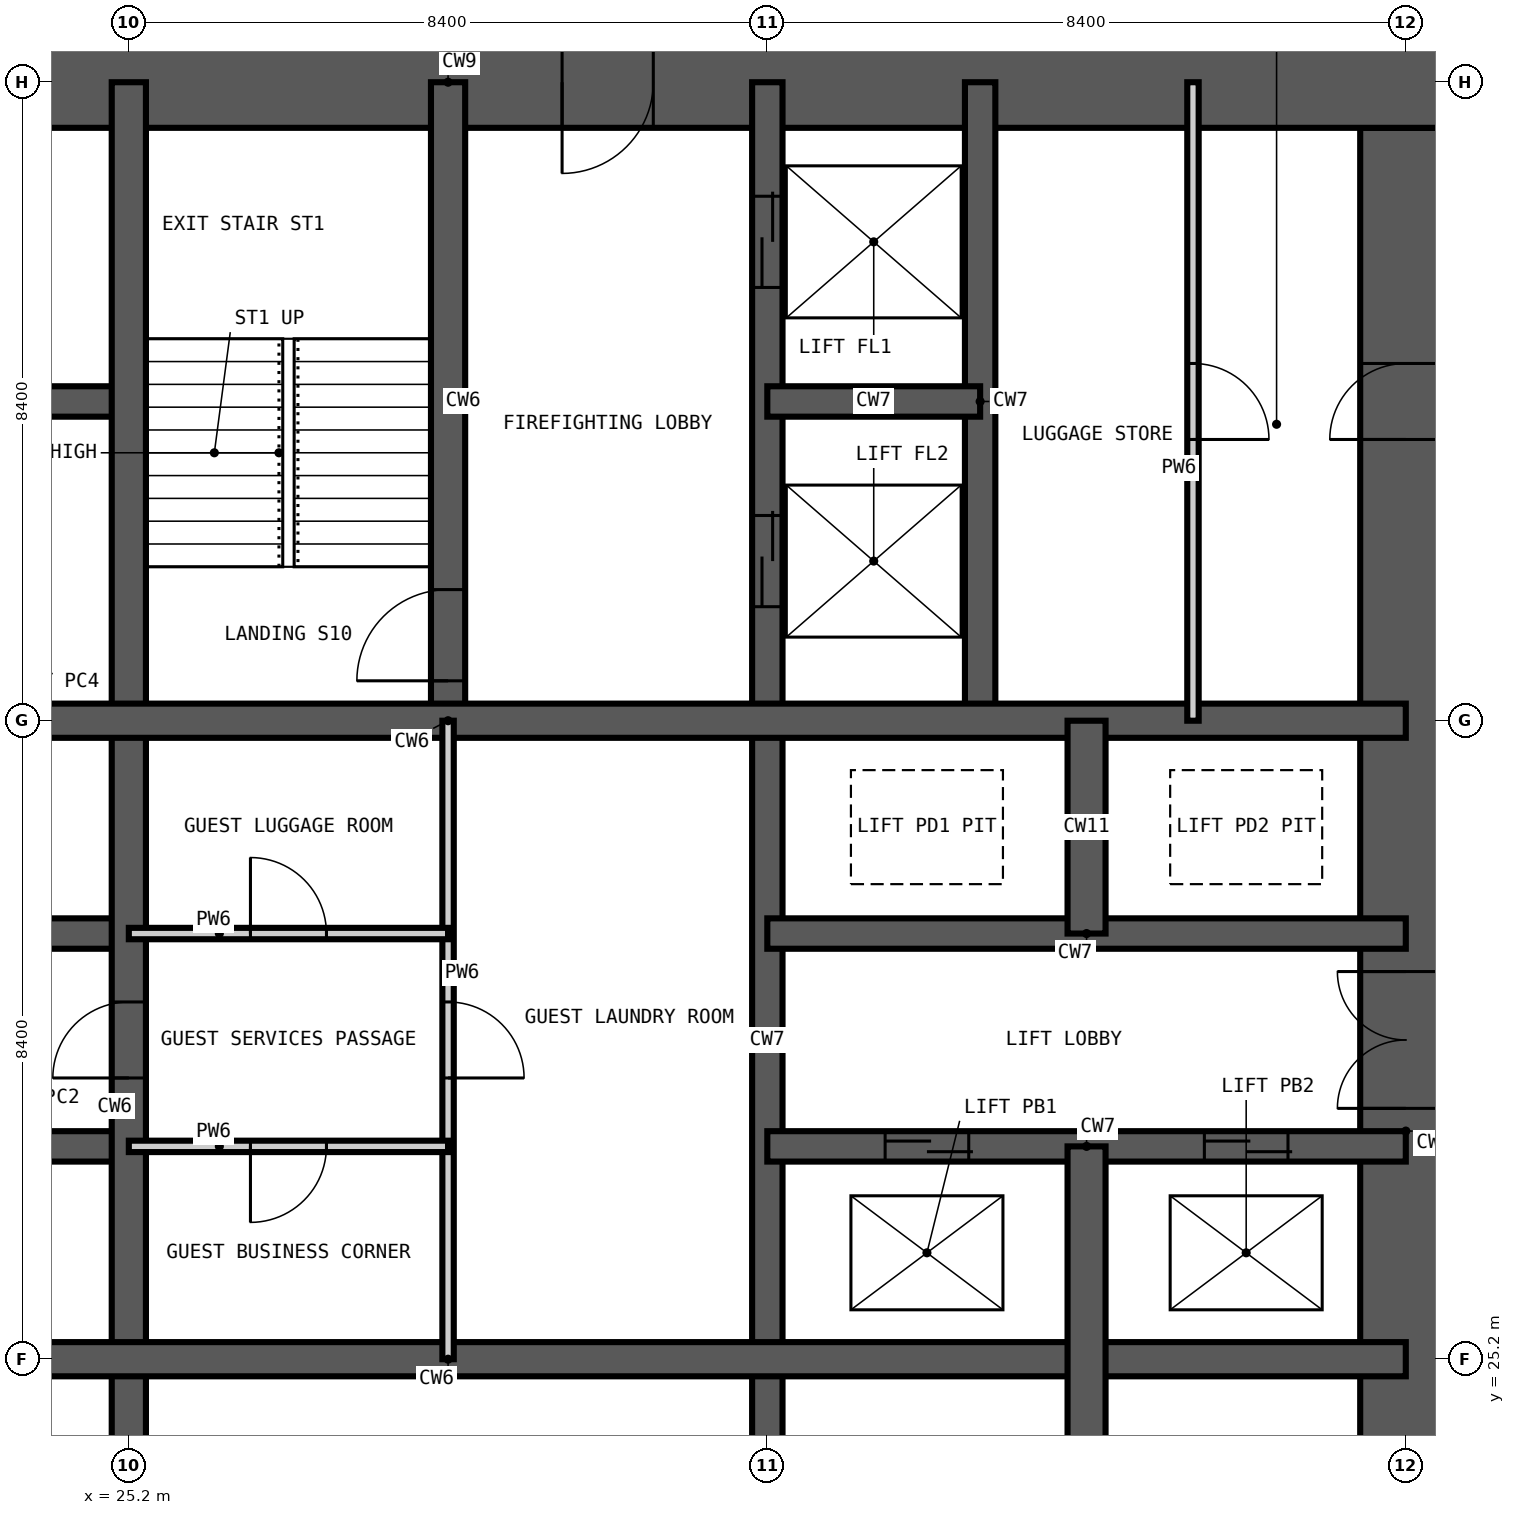
"""IFC4 building model, lengths in metres.
Left out: names, types, materials, properties, quantities, classifications, styles, units other than length and angle.
Written with IfcOpenShell. Run it as: python <this file> out.ifc"""

import sys

from ifc_helpers import new_model, si_unit, direction, frame, frame_2d, origin, place, context, subcontext, project, spatial, rectangle, extrude, element, fill, save


model = new_model("IFC4")
c1 = context("Model", 3, precision=1e-05, world=origin(), true_north=direction((0.0, 1.0)))
c2 = subcontext(c1, "Body", "Model", "MODEL_VIEW")
j1 = project(units=[si_unit("LENGTHUNIT", "METRE"), si_unit("PLANEANGLEUNIT", "RADIAN")], contexts=[c1])
p1 = place(None, origin())
s1 = spatial("IfcSite", under=j1, at=p1, CompositionType="ELEMENT")
p2 = place(p1, origin())
s2 = spatial("IfcBuilding", under=s1, at=p2, CompositionType="ELEMENT")
p3 = place(p2, frame((0.0, 0.0, 144.0)))
s3 = spatial("IfcBuildingStorey", under=s2, at=p3, CompositionType="ELEMENT", Elevation=144.0)
p4 = place(p3, frame((42.0, 17.4, -0.35), z_axis=(0.0, 0.0, 1.0), x_axis=(0.0, 1.0, 0.0)))
e1 = element("IfcWall", 1, at=p4, inside=s3, PredefinedType="SHEAR", context=c2, shape_type="SweptSolid", body=[
    extrude(rectangle(XDim=24.0, YDim=1.2, at=frame_2d((12.0, 0.0))), origin(), (0.0, 0.0, 1.0), 3.6),
])
p5 = place(p4, frame((0.2, 0.0, 0.35)))
e2 = element("IfcOpeningElement", 2, at=p5, cuts=e1, PredefinedType="OPENING", context=c2, shape_type="SweptSolid", body=[
    extrude(rectangle(XDim=1.2, YDim=2.2, at=frame_2d((0.6, 1.1))), frame((0.0, 0.61, 0.0), z_axis=(0.0, -1.0, 0.0), x_axis=(1.0, 0.0, 0.0)), (0.0, 0.0, 1.0), 1.22),
])
p6 = place(p4, frame((11.1, 0.0, 0.35)))
e3 = element("IfcOpeningElement", 3, at=p6, cuts=e1, PredefinedType="OPENING", context=c2, shape_type="SweptSolid", body=[
    extrude(rectangle(XDim=1.8, YDim=2.2, at=frame_2d((0.9, 1.1))), frame((0.0, 0.61, 0.0), z_axis=(0.0, -1.0, 0.0), x_axis=(1.0, 0.0, 0.0)), (0.0, 0.0, 1.0), 1.22),
])
p7 = place(p4, frame((19.9, 0.0, 0.35)))
e4 = element("IfcOpeningElement", 4, at=p7, cuts=e1, PredefinedType="OPENING", context=c2, shape_type="SweptSolid", body=[
    extrude(rectangle(XDim=1.0, YDim=2.1, at=frame_2d((0.5, 1.05))), frame((0.0, 0.61, 0.0), z_axis=(0.0, -1.0, 0.0), x_axis=(1.0, 0.0, 0.0)), (0.0, 0.0, 1.0), 1.22),
])
p8 = place(p3, frame((42.6, 42.0, -0.35), z_axis=(0.0, 0.0, 1.0), x_axis=(-1.0, 0.0, 0.0)))
e5 = element("IfcWall", 5, at=p8, inside=s3, PredefinedType="SHEAR", context=c2, shape_type="SweptSolid", body=[
    extrude(rectangle(XDim=26.4, YDim=1.2, at=frame_2d((13.2, 0.0))), origin(), (0.0, 0.0, 1.0), 3.6),
])
p9 = place(p8, frame((21.1, 0.0, 0.35)))
e6 = element("IfcOpeningElement", 6, at=p9, cuts=e5, PredefinedType="OPENING", context=c2, shape_type="SweptSolid", body=[
    extrude(rectangle(XDim=1.0, YDim=2.1, at=frame_2d((0.5, 1.05))), frame((0.0, 0.61, 0.0), z_axis=(0.0, -1.0, 0.0), x_axis=(1.0, 0.0, 0.0)), (0.0, 0.0, 1.0), 1.22),
])
p10 = place(p8, frame((10.5, 0.0, 0.35)))
e7 = element("IfcOpeningElement", 7, at=p10, cuts=e5, PredefinedType="OPENING", context=c2, shape_type="SweptSolid", body=[
    extrude(rectangle(XDim=1.2, YDim=2.2, at=frame_2d((0.6, 1.1))), frame((0.0, 0.61, 0.0), z_axis=(0.0, -1.0, 0.0), x_axis=(1.0, 0.0, 0.0)), (0.0, 0.0, 1.0), 1.22),
])
p11 = place(p3, frame((33.6, 16.8, -0.35), z_axis=(0.0, 0.0, 1.0), x_axis=(0.0, 1.0, 0.0)))
e8 = element("IfcWall", 8, at=p11, inside=s3, PredefinedType="SHEAR", context=c2, shape_type="SweptSolid", body=[
    extrude(rectangle(XDim=25.2, YDim=0.4, at=frame_2d((12.6, 0.0))), origin(), (0.0, 0.0, 1.0), 3.6),
])
p12 = place(p11, frame((22.5, 0.0, 0.35)))
e9 = element("IfcOpeningElement", 9, at=p12, cuts=e8, PredefinedType="OPENING", context=c2, shape_type="SweptSolid", body=[
    extrude(rectangle(XDim=1.2, YDim=2.2, at=frame_2d((0.6, 1.1))), frame((0.0, 0.21, 0.0), z_axis=(0.0, -1.0, 0.0), x_axis=(1.0, 0.0, 0.0)), (0.0, 0.0, 1.0), 0.42),
])
p13 = place(p11, frame((18.3, 0.0, 0.35)))
e10 = element("IfcOpeningElement", 10, at=p13, cuts=e8, PredefinedType="OPENING", context=c2, shape_type="SweptSolid", body=[
    extrude(rectangle(XDim=1.2, YDim=2.2, at=frame_2d((0.6, 1.1))), frame((0.0, 0.21, 0.0), z_axis=(0.0, -1.0, 0.0), x_axis=(1.0, 0.0, 0.0)), (0.0, 0.0, 1.0), 0.42),
])
p14 = place(p3, frame((36.4, 33.6, -0.35), z_axis=(0.0, 0.0, 1.0), x_axis=(0.0, 1.0, 0.0)))
e11 = element("IfcWall", 11, at=p14, inside=s3, PredefinedType="SHEAR", context=c2, shape_type="SweptSolid", body=[
    extrude(rectangle(XDim=8.4, YDim=0.4, at=frame_2d((4.2, 0.0))), origin(), (0.0, 0.0, 1.0), 3.6),
])
p15 = place(p3, frame((16.8, 28.0, -0.35), z_axis=(0.0, 0.0, 1.0), x_axis=(1.0, 0.0, 0.0)))
e12 = element("IfcWall", 12, at=p15, inside=s3, PredefinedType="SHEAR", context=c2, shape_type="SweptSolid", body=[
    extrude(rectangle(XDim=8.4, YDim=0.4, at=frame_2d((4.2, 0.0))), origin(), (0.0, 0.0, 1.0), 3.6),
])
p16 = place(p15, frame((1.55, 0.0, 0.35)))
e13 = element("IfcOpeningElement", 13, at=p16, cuts=e12, PredefinedType="OPENING", context=c2, shape_type="SweptSolid", body=[
    extrude(rectangle(XDim=1.1, YDim=2.2, at=frame_2d((0.55, 1.1))), frame((0.0, 0.21, 0.0), z_axis=(0.0, -1.0, 0.0), x_axis=(1.0, 0.0, 0.0)), (0.0, 0.0, 1.0), 0.42),
])
p17 = place(p15, frame((5.75, 0.0, 0.35)))
e14 = element("IfcOpeningElement", 14, at=p17, cuts=e12, PredefinedType="OPENING", context=c2, shape_type="SweptSolid", body=[
    extrude(rectangle(XDim=1.1, YDim=2.2, at=frame_2d((0.55, 1.1))), frame((0.0, 0.21, 0.0), z_axis=(0.0, -1.0, 0.0), x_axis=(1.0, 0.0, 0.0)), (0.0, 0.0, 1.0), 0.42),
])
p18 = place(p3, frame((33.6, 28.0, -0.35), z_axis=(0.0, 0.0, 1.0), x_axis=(1.0, 0.0, 0.0)))
e15 = element("IfcWall", 15, at=p18, inside=s3, PredefinedType="SHEAR", context=c2, shape_type="SweptSolid", body=[
    extrude(rectangle(XDim=8.4, YDim=0.4, at=frame_2d((4.2, 0.0))), origin(), (0.0, 0.0, 1.0), 3.6),
])
p19 = place(p18, frame((1.55, 0.0, 0.35)))
e16 = element("IfcOpeningElement", 16, at=p19, cuts=e15, PredefinedType="OPENING", context=c2, shape_type="SweptSolid", body=[
    extrude(rectangle(XDim=1.1, YDim=2.2, at=frame_2d((0.55, 1.1))), frame((0.0, 0.21, 0.0), z_axis=(0.0, -1.0, 0.0), x_axis=(1.0, 0.0, 0.0)), (0.0, 0.0, 1.0), 0.42),
])
p20 = place(p18, frame((5.75, 0.0, 0.35)))
e17 = element("IfcOpeningElement", 17, at=p20, cuts=e15, PredefinedType="OPENING", context=c2, shape_type="SweptSolid", body=[
    extrude(rectangle(XDim=1.1, YDim=2.2, at=frame_2d((0.55, 1.1))), frame((0.0, 0.21, 0.0), z_axis=(0.0, -1.0, 0.0), x_axis=(1.0, 0.0, 0.0)), (0.0, 0.0, 1.0), 0.42),
])
p21 = place(p3, frame((16.8, 30.8, -0.35), z_axis=(0.0, 0.0, 1.0), x_axis=(1.0, 0.0, 0.0)))
e18 = element("IfcWall", 18, at=p21, inside=s3, PredefinedType="SHEAR", context=c2, shape_type="SweptSolid", body=[
    extrude(rectangle(XDim=8.4, YDim=0.4, at=frame_2d((4.2, 0.0))), origin(), (0.0, 0.0, 1.0), 3.6),
])
p22 = place(p21, frame((1.55, 0.0, 0.35)))
e19 = element("IfcOpeningElement", 19, at=p22, cuts=e18, PredefinedType="OPENING", context=c2, shape_type="SweptSolid", body=[
    extrude(rectangle(XDim=1.1, YDim=2.2, at=frame_2d((0.55, 1.1))), frame((0.0, 0.21, 0.0), z_axis=(0.0, -1.0, 0.0), x_axis=(1.0, 0.0, 0.0)), (0.0, 0.0, 1.0), 0.42),
])
p23 = place(p21, frame((5.75, 0.0, 0.35)))
e20 = element("IfcOpeningElement", 20, at=p23, cuts=e18, PredefinedType="OPENING", context=c2, shape_type="SweptSolid", body=[
    extrude(rectangle(XDim=1.1, YDim=2.2, at=frame_2d((0.55, 1.1))), frame((0.0, 0.21, 0.0), z_axis=(0.0, -1.0, 0.0), x_axis=(1.0, 0.0, 0.0)), (0.0, 0.0, 1.0), 0.42),
])
for number, where, z_axis, x_axis in (
    (21, (33.6, 30.8, -0.35), (0.0, 0.0, 1.0), (1.0, 0.0, 0.0)),
    (22, (16.8, 37.8, -0.35), (0.0, 0.0, 1.0), (1.0, 0.0, 0.0)),
):
    element("IfcWall", number, at=place(p3, frame(where, z_axis=z_axis, x_axis=x_axis)), inside=s3, PredefinedType="SHEAR", context=c2, shape_type="SweptSolid", body=[
        extrude(rectangle(XDim=8.4, YDim=0.4, at=frame_2d((4.2, 0.0))), origin(), (0.0, 0.0, 1.0), 3.6),
    ])
p24 = place(p3, frame((33.6, 37.8, -0.35), z_axis=(0.0, 0.0, 1.0), x_axis=(1.0, 0.0, 0.0)))
e23 = element("IfcWall", 23, at=p24, inside=s3, PredefinedType="SHEAR", context=c2, shape_type="SweptSolid", body=[
    extrude(rectangle(XDim=2.8, YDim=0.4, at=frame_2d((1.4, 0.0))), origin(), (0.0, 0.0, 1.0), 3.6),
])
p25 = place(p3, frame((25.2, 16.8, -0.35), z_axis=(0.0, 0.0, 1.0), x_axis=(0.0, 1.0, 0.0)))
e24 = element("IfcWall", 24, at=p25, inside=s3, PredefinedType="SHEAR", context=c2, shape_type="SweptSolid", body=[
    extrude(rectangle(XDim=25.2, YDim=0.45, at=frame_2d((12.6, 0.0))), origin(), (0.0, 0.0, 1.0), 3.6),
])
p26 = place(p25, frame((12.1, 0.0, 0.35)))
e25 = element("IfcOpeningElement", 25, at=p26, cuts=e24, PredefinedType="OPENING", context=c2, shape_type="SweptSolid", body=[
    extrude(rectangle(XDim=1.0, YDim=2.1, at=frame_2d((0.5, 1.05))), frame((0.0, 0.235, 0.0), z_axis=(0.0, -1.0, 0.0), x_axis=(1.0, 0.0, 0.0)), (0.0, 0.0, 1.0), 0.47),
])
p27 = place(p3, frame((29.4, 33.6, -0.35), z_axis=(0.0, 0.0, 1.0), x_axis=(0.0, 1.0, 0.0)))
e26 = element("IfcWall", 26, at=p27, inside=s3, PredefinedType="SHEAR", context=c2, shape_type="SweptSolid", body=[
    extrude(rectangle(XDim=8.4, YDim=0.45, at=frame_2d((4.2, 0.0))), origin(), (0.0, 0.0, 1.0), 3.6),
])
p28 = place(p27, frame((0.525, 0.0, 0.35)))
e27 = element("IfcOpeningElement", 27, at=p28, cuts=e26, PredefinedType="OPENING", context=c2, shape_type="SweptSolid", body=[
    extrude(rectangle(XDim=1.2, YDim=2.2, at=frame_2d((0.6, 1.1))), frame((0.0, 0.235, 0.0), z_axis=(0.0, -1.0, 0.0), x_axis=(1.0, 0.0, 0.0)), (0.0, 0.0, 1.0), 0.47),
])
for number, where, z_axis, x_axis in (
    (28, (16.8, 25.2, -0.35), (0.0, 0.0, 1.0), (1.0, 0.0, 0.0)),
    (29, (16.8, 33.6, -0.35), (0.0, 0.0, 1.0), (1.0, 0.0, 0.0)),
):
    element("IfcWall", number, at=place(p3, frame(where, z_axis=z_axis, x_axis=x_axis)), inside=s3, PredefinedType="SHEAR", context=c2, shape_type="SweptSolid", body=[
        extrude(rectangle(XDim=25.2, YDim=0.45, at=frame_2d((12.6, 0.0))), origin(), (0.0, 0.0, 1.0), 3.6),
    ])
p29 = place(p3, frame((37.8, 16.8, -0.35), z_axis=(0.0, 0.0, 1.0), x_axis=(0.0, 1.0, 0.0)))
e30 = element("IfcWall", 30, at=p29, inside=s3, PredefinedType="SHEAR", context=c2, shape_type="SweptSolid", body=[
    extrude(rectangle(XDim=11.2, YDim=0.5, at=frame_2d((5.6, 0.0))), origin(), (0.0, 0.0, 1.0), 3.6),
])
p30 = place(p3, frame((37.8, 30.8, -0.35), z_axis=(0.0, 0.0, 1.0), x_axis=(0.0, 1.0, 0.0)))
e31 = element("IfcWall", 31, at=p30, inside=s3, PredefinedType="SHEAR", context=c2, shape_type="SweptSolid", body=[
    extrude(rectangle(XDim=2.8, YDim=0.5, at=frame_2d((1.4, 0.0))), origin(), (0.0, 0.0, 1.0), 3.6),
])
p31 = place(p3, frame((29.4, 25.2, 0.0), z_axis=(0.0, 0.0, 1.0), x_axis=(0.0, 1.0, 0.0)))
e32 = element("IfcWall", 32, at=p31, inside=s3, PredefinedType="PARTITIONING", context=c2, shape_type="SweptSolid", body=[
    extrude(rectangle(XDim=8.4, YDim=0.15, at=frame_2d((4.2, 0.0))), origin(), (0.0, 0.0, 1.0), 3.25),
])
p32 = place(p31, frame((3.7, 0.0, 0.0)))
e33 = element("IfcOpeningElement", 33, at=p32, cuts=e32, PredefinedType="OPENING", context=c2, shape_type="SweptSolid", body=[
    extrude(rectangle(XDim=1.0, YDim=2.1, at=frame_2d((0.5, 1.05))), frame((0.0, 0.085, 0.0), z_axis=(0.0, -1.0, 0.0), x_axis=(1.0, 0.0, 0.0)), (0.0, 0.0, 1.0), 0.17),
])
p33 = place(p3, frame((39.2, 33.6, 0.0), z_axis=(0.0, 0.0, 1.0), x_axis=(0.0, 1.0, 0.0)))
e34 = element("IfcWall", 34, at=p33, inside=s3, PredefinedType="PARTITIONING", context=c2, shape_type="SweptSolid", body=[
    extrude(rectangle(XDim=8.4, YDim=0.15, at=frame_2d((4.2, 0.0))), origin(), (0.0, 0.0, 1.0), 3.25),
])
p34 = place(p33, frame((3.7, 0.0, 0.0)))
e35 = element("IfcOpeningElement", 35, at=p34, cuts=e34, PredefinedType="OPENING", context=c2, shape_type="SweptSolid", body=[
    extrude(rectangle(XDim=1.0, YDim=2.1, at=frame_2d((0.5, 1.05))), frame((0.0, 0.085, 0.0), z_axis=(0.0, -1.0, 0.0), x_axis=(1.0, 0.0, 0.0)), (0.0, 0.0, 1.0), 0.17),
])
p35 = place(p3, frame((25.2, 28.0, 0.0), z_axis=(0.0, 0.0, 1.0), x_axis=(1.0, 0.0, 0.0)))
e36 = element("IfcWall", 36, at=p35, inside=s3, PredefinedType="PARTITIONING", context=c2, shape_type="SweptSolid", body=[
    extrude(rectangle(XDim=4.2, YDim=0.15, at=frame_2d((2.1, 0.0))), origin(), (0.0, 0.0, 1.0), 3.25),
])
p36 = place(p35, frame((1.6, 0.0, 0.0)))
e37 = element("IfcOpeningElement", 37, at=p36, cuts=e36, PredefinedType="OPENING", context=c2, shape_type="SweptSolid", body=[
    extrude(rectangle(XDim=1.0, YDim=2.1, at=frame_2d((0.5, 1.05))), frame((0.0, 0.085, 0.0), z_axis=(0.0, -1.0, 0.0), x_axis=(1.0, 0.0, 0.0)), (0.0, 0.0, 1.0), 0.17),
])
p37 = place(p3, frame((25.2, 30.8, 0.0), z_axis=(0.0, 0.0, 1.0), x_axis=(1.0, 0.0, 0.0)))
e38 = element("IfcWall", 38, at=p37, inside=s3, PredefinedType="PARTITIONING", context=c2, shape_type="SweptSolid", body=[
    extrude(rectangle(XDim=4.2, YDim=0.15, at=frame_2d((2.1, 0.0))), origin(), (0.0, 0.0, 1.0), 3.25),
])
p38 = place(p37, frame((1.6, 0.0, 0.0)))
e39 = element("IfcOpeningElement", 39, at=p38, cuts=e38, PredefinedType="OPENING", context=c2, shape_type="SweptSolid", body=[
    extrude(rectangle(XDim=1.0, YDim=2.1, at=frame_2d((0.5, 1.05))), frame((0.0, 0.085, 0.0), z_axis=(0.0, -1.0, 0.0), x_axis=(1.0, 0.0, 0.0)), (0.0, 0.0, 1.0), 0.17),
])
p39 = place(p28, origin())
e40 = element("IfcDoor", 40, at=p39, inside=s3, OperationType="SINGLE_SWING_LEFT", PredefinedType="DOOR", context=c2, shape_type="SweptSolid", body=[
    extrude(rectangle(XDim=1.2, YDim=2.2, at=frame_2d((0.6, 1.1))), frame((0.0, 0.025, 0.0), z_axis=(0.0, -1.0, 0.0), x_axis=(1.0, 0.0, 0.0)), (0.0, 0.0, 1.0), 0.05),
])
fill(e27, e40)
p40 = place(p19, origin())
e41 = element("IfcDoor", 41, at=p40, inside=s3, OperationType="DOUBLE_DOOR_SLIDING", PredefinedType="DOOR", context=c2, shape_type="SweptSolid", body=[
    extrude(rectangle(XDim=1.1, YDim=2.2, at=frame_2d((0.55, 1.1))), frame((0.0, 0.025, 0.0), z_axis=(0.0, -1.0, 0.0), x_axis=(1.0, 0.0, 0.0)), (0.0, 0.0, 1.0), 0.05),
])
fill(e16, e41)
p41 = place(p20, origin())
e42 = element("IfcDoor", 42, at=p41, inside=s3, OperationType="DOUBLE_DOOR_SLIDING", PredefinedType="DOOR", context=c2, shape_type="SweptSolid", body=[
    extrude(rectangle(XDim=1.1, YDim=2.2, at=frame_2d((0.55, 1.1))), frame((0.0, 0.025, 0.0), z_axis=(0.0, -1.0, 0.0), x_axis=(1.0, 0.0, 0.0)), (0.0, 0.0, 1.0), 0.05),
])
fill(e17, e42)
p42 = place(p12, origin())
e43 = element("IfcDoor", 43, at=p42, inside=s3, OperationType="DOUBLE_DOOR_SLIDING", PredefinedType="DOOR", context=c2, shape_type="SweptSolid", body=[
    extrude(rectangle(XDim=1.2, YDim=2.2, at=frame_2d((0.6, 1.1))), frame((0.0, 0.025, 0.0), z_axis=(0.0, -1.0, 0.0), x_axis=(1.0, 0.0, 0.0)), (0.0, 0.0, 1.0), 0.05),
])
fill(e9, e43)
p43 = place(p13, origin())
e44 = element("IfcDoor", 44, at=p43, inside=s3, OperationType="DOUBLE_DOOR_SLIDING", PredefinedType="DOOR", context=c2, shape_type="SweptSolid", body=[
    extrude(rectangle(XDim=1.2, YDim=2.2, at=frame_2d((0.6, 1.1))), frame((0.0, 0.025, 0.0), z_axis=(0.0, -1.0, 0.0), x_axis=(1.0, 0.0, 0.0)), (0.0, 0.0, 1.0), 0.05),
])
fill(e10, e44)
p44 = place(p26, origin())
e45 = element("IfcDoor", 45, at=p44, inside=s3, OperationType="SINGLE_SWING_LEFT", PredefinedType="DOOR", context=c2, shape_type="SweptSolid", body=[
    extrude(rectangle(XDim=1.0, YDim=2.1, at=frame_2d((0.5, 1.05))), frame((0.0, 0.025, 0.0), z_axis=(0.0, -1.0, 0.0), x_axis=(1.0, 0.0, 0.0)), (0.0, 0.0, 1.0), 0.05),
])
fill(e25, e45)
p45 = place(p36, frame((1.0, 0.0, 0.0), z_axis=(0.0, 0.0, 1.0), x_axis=(-1.0, 0.0, 0.0)))
e46 = element("IfcDoor", 46, at=p45, inside=s3, OperationType="SINGLE_SWING_RIGHT", PredefinedType="DOOR", context=c2, shape_type="SweptSolid", body=[
    extrude(rectangle(XDim=1.0, YDim=2.1, at=frame_2d((0.5, 1.05))), frame((0.0, 0.025, 0.0), z_axis=(0.0, -1.0, 0.0), x_axis=(1.0, 0.0, 0.0)), (0.0, 0.0, 1.0), 0.05),
])
fill(e37, e46)
p46 = place(p38, origin())
e47 = element("IfcDoor", 47, at=p46, inside=s3, OperationType="SINGLE_SWING_LEFT", PredefinedType="DOOR", context=c2, shape_type="SweptSolid", body=[
    extrude(rectangle(XDim=1.0, YDim=2.1, at=frame_2d((0.5, 1.05))), frame((0.0, 0.025, 0.0), z_axis=(0.0, -1.0, 0.0), x_axis=(1.0, 0.0, 0.0)), (0.0, 0.0, 1.0), 0.05),
])
fill(e39, e47)
p47 = place(p32, frame((1.0, 0.0, 0.0), z_axis=(0.0, 0.0, 1.0), x_axis=(-1.0, 0.0, 0.0)))
e48 = element("IfcDoor", 48, at=p47, inside=s3, OperationType="SINGLE_SWING_RIGHT", PredefinedType="DOOR", context=c2, shape_type="SweptSolid", body=[
    extrude(rectangle(XDim=1.0, YDim=2.1, at=frame_2d((0.5, 1.05))), frame((0.0, 0.025, 0.0), z_axis=(0.0, -1.0, 0.0), x_axis=(1.0, 0.0, 0.0)), (0.0, 0.0, 1.0), 0.05),
])
fill(e33, e48)
p48 = place(p6, origin())
e49 = element("IfcDoor", 49, at=p48, inside=s3, OperationType="DOUBLE_DOOR_DOUBLE_SWING", PredefinedType="DOOR", context=c2, shape_type="SweptSolid", body=[
    extrude(rectangle(XDim=1.8, YDim=2.2, at=frame_2d((0.9, 1.1))), frame((0.0, 0.025, 0.0), z_axis=(0.0, -1.0, 0.0), x_axis=(1.0, 0.0, 0.0)), (0.0, 0.0, 1.0), 0.05),
])
fill(e3, e49)
p49 = place(p10, origin())
e50 = element("IfcDoor", 50, at=p49, inside=s3, OperationType="SINGLE_SWING_RIGHT", PredefinedType="DOOR", context=c2, shape_type="SweptSolid", body=[
    extrude(rectangle(XDim=1.2, YDim=2.2, at=frame_2d((0.6, 1.1))), frame((0.0, 0.025, 0.0), z_axis=(0.0, -1.0, 0.0), x_axis=(1.0, 0.0, 0.0)), (0.0, 0.0, 1.0), 0.05),
])
fill(e7, e50)
p50 = place(p7, origin())
e51 = element("IfcDoor", 51, at=p50, inside=s3, OperationType="SINGLE_SWING_LEFT", PredefinedType="DOOR", context=c2, shape_type="SweptSolid", body=[
    extrude(rectangle(XDim=1.0, YDim=2.1, at=frame_2d((0.5, 1.05))), frame((0.0, 0.025, 0.0), z_axis=(0.0, -1.0, 0.0), x_axis=(1.0, 0.0, 0.0)), (0.0, 0.0, 1.0), 0.05),
])
fill(e4, e51)
p51 = place(p34, frame((1.0, 0.0, 0.0), z_axis=(0.0, 0.0, 1.0), x_axis=(-1.0, 0.0, 0.0)))
e52 = element("IfcDoor", 52, at=p51, inside=s3, OperationType="SINGLE_SWING_RIGHT", PredefinedType="DOOR", context=c2, shape_type="SweptSolid", body=[
    extrude(rectangle(XDim=1.0, YDim=2.1, at=frame_2d((0.5, 1.05))), frame((0.0, 0.025, 0.0), z_axis=(0.0, -1.0, 0.0), x_axis=(1.0, 0.0, 0.0)), (0.0, 0.0, 1.0), 0.05),
])
fill(e35, e52)
save(model, sys.argv[1])
